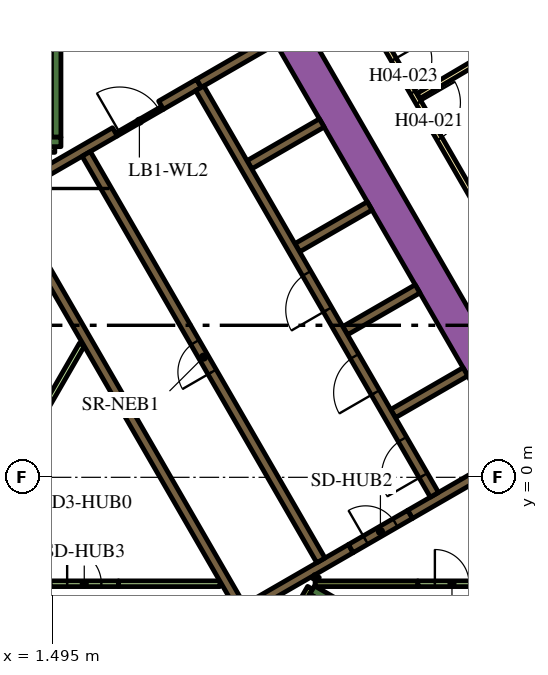
"""IFC4 building model, lengths in metres.
Left out: names, types, materials, properties, quantities, classifications, styles, units other than length and angle.
Written with IfcOpenShell. Run it as: python <this file> out.ifc"""

import sys

from ifc_helpers import new_model, si_unit, direction, frame, frame_2d, origin, place, context, subcontext, project, spatial, polyline, rectangle, outline, extrude, element, fill, save


model = new_model("IFC4")
c1 = context("Model", 3, precision=1e-05, world=origin(), true_north=direction((0.0, 1.0)))
c2 = subcontext(c1, "Body", "Model", "MODEL_VIEW")
j1 = project(units=[si_unit("LENGTHUNIT", "METRE"), si_unit("PLANEANGLEUNIT", "RADIAN")], contexts=[c1])
p1 = place(None, origin())
s1 = spatial("IfcSite", under=j1, at=p1, CompositionType="ELEMENT")
p2 = place(p1, origin())
s2 = spatial("IfcBuilding", under=s1, at=p2, CompositionType="ELEMENT")
p3 = place(p2, frame((0.0, 0.0, 62.7)))
s3 = spatial("IfcBuildingStorey", under=s2, at=p3, CompositionType="ELEMENT", Elevation=62.7)
p4 = place(p3, frame((6.776, 13.364, 0.0), z_axis=(0.0, 0.0, 1.0), x_axis=(0.500004177138, -0.8660229921, 0.0)))
e1 = element("IfcWall", 1, at=p4, inside=s3, PredefinedType="SOLIDWALL", context=c2, shape_type="SweptSolid", body=[
    extrude(rectangle(XDim=20.204, YDim=0.9, at=frame_2d((10.102, 0.0))), origin(), (0.0, 0.0, 1.0), 3.9),
])
p5 = place(p3, frame((8.334, -2.964, 0.0), z_axis=(0.0, 0.0, 1.0), x_axis=(0.866016039709, -0.500016218704, 0.0)))
e2 = element("IfcWall", 2, at=p5, inside=s3, PredefinedType="SOLIDWALL", context=c2, shape_type="SweptSolid", body=[
    extrude(rectangle(XDim=7.05, YDim=0.25, at=frame_2d((3.525, 0.0))), origin(), (0.0, 0.0, 1.0), 3.9),
])
p6 = place(p3, frame((8.163, -3.511, 0.0), z_axis=(0.0, 0.0, 1.0), x_axis=(0.500127794843, 0.865951608824, 0.0)))
e3 = element("IfcWall", 3, at=p6, inside=s3, PredefinedType="SOLIDWALL", context=c2, shape_type="SweptSolid", body=[
    extrude(rectangle(XDim=0.435, YDim=0.25, at=frame_2d((0.217, 0.0))), origin(), (0.0, 0.0, 1.0), 3.9),
])
p7 = place(p3, frame((1.6, 8.95, 0.0), z_axis=(0.0, 0.0, 1.0), x_axis=(0.0, 1.0, 0.0)))
e4 = element("IfcWall", 4, at=p7, inside=s3, PredefinedType="SOLIDWALL", context=c2, shape_type="SweptSolid", body=[
    extrude(rectangle(XDim=6.8, YDim=0.25, at=frame_2d((3.4, 0.0))), origin(), (0.0, 0.0, 1.0), 3.9),
])
p8 = place(p3, frame((1.05, 8.825, 0.0), z_axis=(0.0, 0.0, 1.0), x_axis=(1.0, 0.0, 0.0)))
e5 = element("IfcWall", 5, at=p8, inside=s3, PredefinedType="SOLIDWALL", context=c2, shape_type="SweptSolid", body=[
    extrude(rectangle(XDim=0.675, YDim=0.25, at=frame_2d((0.337, 0.0))), origin(), (0.0, 0.0, 1.0), 3.9),
])
p9 = place(p3, frame((10.464, 1.677, 0.0), z_axis=(0.0, 0.0, 1.0), x_axis=(0.86605622881, 0.499946605688, 0.0)))
e6 = element("IfcWall", 6, at=p9, inside=s3, PredefinedType="SOLIDWALL", context=c2, shape_type="SweptSolid", body=[
    extrude(rectangle(XDim=2.2, YDim=0.25, at=frame_2d((1.1, 0.0))), origin(), (0.0, 0.0, 1.0), 3.9),
])
p10 = place(p3, origin())
e7 = element("IfcWall", 7, at=p10, inside=s3, PredefinedType="SOLIDWALL", context=c2, shape_type="SweptSolid", body=[
    extrude(outline(polyline([(0.335, 6.925), (0.335, 6.925), (0.335, 7.075), (0.335, 7.075), (0.335, 7.075), (0.245, 7.075), (0.079, 7.363), (0.035, 7.439), (0.252, 7.564), (0.377, 7.348), (6.552, -3.348), (6.677, -3.564), (6.46, -3.689), (4.897, -0.981), (0.332, 6.925), (0.335, 6.925), (0.335, 6.925)])), origin(), (0.0, 0.0, 1.0), 3.9),
])
p11 = place(p3, frame((4.358, 9.791, 0.0), z_axis=(0.0, 0.0, 1.0), x_axis=(0.866079547155, 0.499906209203, 0.0)))
e8 = element("IfcWall", 8, at=p11, inside=s3, PredefinedType="SOLIDWALL", context=c2, shape_type="SweptSolid", body=[
    extrude(rectangle(XDim=1.15, YDim=0.25, at=frame_2d((0.575, 0.0))), origin(), (0.0, 0.0, 1.0), 3.9),
])
p12 = place(p3, frame((5.356, 10.367, 0.0), z_axis=(0.0, 0.0, 1.0), x_axis=(0.865978535641, 0.50008116922, 0.0)))
e9 = element("IfcWall", 9, at=p12, inside=s3, PredefinedType="SOLIDWALL", context=c2, shape_type="SweptSolid", body=[
    extrude(rectangle(XDim=2.278, YDim=0.25, at=frame_2d((1.139, 0.0))), origin(), (0.0, 0.0, 1.0), 3.9),
])
p13 = place(p3, frame((0.314, 7.456, 0.0), z_axis=(0.0, 0.0, 1.0), x_axis=(0.866013897511, 0.50001992892, 0.0)))
e10 = element("IfcWall", 10, at=p13, inside=s3, PredefinedType="SOLIDWALL", context=c2, shape_type="SweptSolid", body=[
    extrude(rectangle(XDim=3.268, YDim=0.25, at=frame_2d((1.634, 0.0))), origin(), (0.0, 0.0, 1.0), 3.9),
])
p14 = place(p3, frame((9.352, -1.875, 0.0), z_axis=(0.0, 0.0, 1.0), x_axis=(-0.866024844342, -0.500000968981, 0.0)))
e11 = element("IfcWall", 11, at=p14, inside=s3, PredefinedType="SOLIDWALL", context=c2, shape_type="SweptSolid", body=[
    extrude(rectangle(XDim=3.162, YDim=0.25, at=frame_2d((1.581, 0.0))), origin(), (0.0, 0.0, 1.0), 3.9),
])
for number, where, z_axis, x_axis in (
    (12, (6.684, 8.224, 0.0), (0.0, 0.0, 1.0), (0.866, 0.5, 0.0)),
    (13, (7.944, 6.041, 0.0), (0.0, 0.0, 1.0), (0.866, 0.5, 0.0)),
    (14, (9.204, 3.859, 0.0), (0.0, 0.0, 1.0), (0.866, 0.5, 0.0)),
):
    element("IfcWall", number, at=place(p3, frame(where, z_axis=z_axis, x_axis=x_axis)), inside=s3, PredefinedType="SOLIDWALL", context=c2, shape_type="SweptSolid", body=[
        extrude(rectangle(XDim=2.2, YDim=0.25, at=frame_2d((1.1, 0.0))), origin(), (0.0, 0.0, 1.0), 3.9),
    ])
p15 = place(p3, frame((10.911, -0.975, 0.0), z_axis=(0.0, 0.0, 1.0), x_axis=(0.866046979468, 0.499962627957, 0.0)))
e15 = element("IfcWall", 15, at=p15, inside=s3, PredefinedType="SOLIDWALL", context=c2, shape_type="SweptSolid", body=[
    extrude(rectangle(XDim=3.138, YDim=0.25, at=frame_2d((1.569, 0.0))), origin(), (0.0, 0.0, 1.0), 3.9),
])
p16 = place(p3, frame((8.412, -2.8, 0.0), z_axis=(0.0, 0.0, 1.0), x_axis=(1.0, 0.0, 0.0)))
e16 = element("IfcWall", 16, at=p16, inside=s3, PredefinedType="PARTITIONING", context=c2, shape_type="SweptSolid", body=[
    extrude(rectangle(XDim=2.702, YDim=0.15, at=frame_2d((1.351, 0.0))), origin(), (0.0, 0.0, 1.0), 3.9),
])
p17 = place(p3, frame((8.459, -2.599, 0.0), z_axis=(0.0, 0.0, 1.0), x_axis=(-0.501919277433, -0.864914469148, 0.0)))
e17 = element("IfcWall", 17, at=p17, inside=s3, PredefinedType="PARTITIONING", context=c2, shape_type="SweptSolid", body=[
    extrude(rectangle(XDim=0.109, YDim=0.15, at=frame_2d((0.054, 0.0))), origin(), (0.0, 0.0, 1.0), 3.9),
])
p18 = place(p3, frame((8.281, -2.907, 0.0), z_axis=(0.0, 0.0, 1.0), x_axis=(-0.500193841991, -0.86591346013, 0.0)))
e18 = element("IfcWall", 18, at=p18, inside=s3, PredefinedType="PARTITIONING", context=c2, shape_type="SweptSolid", body=[
    extrude(rectangle(XDim=0.583, YDim=0.15, at=frame_2d((0.292, 0.0))), origin(), (0.0, 0.0, 1.0), 3.9),
])
p19 = place(p3, frame((3.238, -2.8, 0.0), z_axis=(0.0, 0.0, 1.0), x_axis=(1.0, 0.0, 0.0)))
e19 = element("IfcWall", 19, at=p19, inside=s3, PredefinedType="PARTITIONING", context=c2, shape_type="SweptSolid", body=[
    extrude(rectangle(XDim=2.672, YDim=0.15, at=frame_2d((1.336, 0.0))), origin(), (0.0, 0.0, 1.0), 2.75),
])
p20 = place(p3, frame((1.016, 1.309, 0.0), z_axis=(0.0, 0.0, 1.0), x_axis=(0.49998231768, 0.866035612436, 0.0)))
e20 = element("IfcWall", 20, at=p20, inside=s3, PredefinedType="PARTITIONING", context=c2, shape_type="SweptSolid", body=[
    extrude(rectangle(XDim=2.521, YDim=0.15, at=frame_2d((1.26, 0.0))), origin(), (0.0, 0.0, 1.0), 2.75),
])
p21 = place(p3, frame((1.05, 8.625, 0.0), z_axis=(0.0, 0.0, 1.0), x_axis=(1.0, 0.0, 0.0)))
e21 = element("IfcWall", 21, at=p21, inside=s3, PredefinedType="PARTITIONING", context=c2, shape_type="SweptSolid", body=[
    extrude(rectangle(XDim=0.514, YDim=0.15, at=frame_2d((0.257, 0.0))), origin(), (0.0, 0.0, 1.0), 2.75),
])
p22 = place(p3, frame((11.553, -0.46, 0.0), z_axis=(0.0, 0.0, 1.0), x_axis=(-0.500006514828, 0.866021642414, 0.0)))
e22 = element("IfcWall", 22, at=p22, inside=s3, PredefinedType="SOLIDWALL", context=c2, shape_type="SweptSolid", body=[
    extrude(rectangle(XDim=12.35, YDim=0.25, at=frame_2d((6.175, 0.0))), origin(), (0.0, 0.0, 1.0), 3.9),
])
p23 = place(p22, frame((0.585, 0.0, 0.0)))
e23 = element("IfcOpeningElement", 23, at=p23, cuts=e22, PredefinedType="OPENING", context=c2, shape_type="SweptSolid", body=[
    extrude(rectangle(XDim=1.1, YDim=2.1, at=frame_2d((0.55, 1.05))), frame((0.0, 0.135, 0.0), z_axis=(0.0, -1.0, 0.0), x_axis=(1.0, 0.0, 0.0)), (0.0, 0.0, 1.0), 0.27),
])
p24 = place(p22, frame((3.105, 0.0, 0.0)))
e24 = element("IfcOpeningElement", 24, at=p24, cuts=e22, PredefinedType="OPENING", context=c2, shape_type="SweptSolid", body=[
    extrude(rectangle(XDim=1.1, YDim=2.1, at=frame_2d((0.55, 1.05))), frame((0.0, 0.135, 0.0), z_axis=(0.0, -1.0, 0.0), x_axis=(1.0, 0.0, 0.0)), (0.0, 0.0, 1.0), 0.27),
])
p25 = place(p22, frame((5.625, 0.0, 0.0)))
e25 = element("IfcOpeningElement", 25, at=p25, cuts=e22, PredefinedType="OPENING", context=c2, shape_type="SweptSolid", body=[
    extrude(rectangle(XDim=1.1, YDim=2.1, at=frame_2d((0.55, 1.05))), frame((0.0, 0.135, 0.0), z_axis=(0.0, -1.0, 0.0), x_axis=(1.0, 0.0, 0.0)), (0.0, 0.0, 1.0), 0.27),
])
p26 = place(p3, frame((8.565, -2.185, 0.0), z_axis=(0.0, 0.0, 1.0), x_axis=(-0.499997954832, 0.866026584559, 0.0)))
e26 = element("IfcWall", 26, at=p26, inside=s3, PredefinedType="SOLIDWALL", context=c2, shape_type="SweptSolid", body=[
    extrude(rectangle(XDim=12.35, YDim=0.25, at=frame_2d((6.175, 0.0))), origin(), (0.0, 0.0, 1.0), 3.9),
])
p27 = place(p26, frame((5.725, 0.0, 0.0)))
e27 = element("IfcOpeningElement", 27, at=p27, cuts=e26, PredefinedType="OPENING", context=c2, shape_type="SweptSolid", body=[
    extrude(rectangle(XDim=0.9, YDim=2.1, at=frame_2d((0.45, 1.05))), frame((0.0, 0.135, 0.0), z_axis=(0.0, -1.0, 0.0), x_axis=(1.0, 0.0, 0.0)), (0.0, 0.0, 1.0), 0.27),
])
p28 = place(p3, frame((3.183, 9.02, 0.0), z_axis=(0.0, 0.0, 1.0), x_axis=(0.866034573852, 0.49998411664, 0.0)))
e28 = element("IfcWall", 28, at=p28, inside=s3, PredefinedType="PARTITIONING", context=c2, shape_type="SweptSolid", body=[
    extrude(rectangle(XDim=1.4, YDim=0.09, at=frame_2d((0.7, 0.0))), origin(), (0.0, 0.0, 1.0), 2.75),
])
p29 = place(p28, frame((0.1, 0.0, 0.0)))
e29 = element("IfcOpeningElement", 29, at=p29, cuts=e28, PredefinedType="OPENING", context=c2, shape_type="SweptSolid", body=[
    extrude(rectangle(XDim=1.2, YDim=2.1, at=frame_2d((0.6, 1.05))), frame((0.0, 0.055, 0.0), z_axis=(0.0, -1.0, 0.0), x_axis=(1.0, 0.0, 0.0)), (0.0, 0.0, 1.0), 0.11),
])
p30 = place(p3, frame((9.352, -1.875, 0.0), z_axis=(0.0, 0.0, 1.0), x_axis=(0.865989075817, 0.500062916607, 0.0)))
e30 = element("IfcWall", 30, at=p30, inside=s3, PredefinedType="SOLIDWALL", context=c2, shape_type="SweptSolid", body=[
    extrude(rectangle(XDim=1.8, YDim=0.25, at=frame_2d((0.9, 0.0))), origin(), (0.0, 0.0, 1.0), 3.9),
])
p31 = place(p30, frame((0.45, 0.0, 0.0)))
e31 = element("IfcOpeningElement", 31, at=p31, cuts=e30, PredefinedType="OPENING", context=c2, shape_type="SweptSolid", body=[
    extrude(rectangle(XDim=0.9, YDim=2.1, at=frame_2d((0.45, 1.05))), frame((0.0, 0.135, 0.0), z_axis=(0.0, -1.0, 0.0), x_axis=(1.0, 0.0, 0.0)), (0.0, 0.0, 1.0), 0.27),
])
p32 = place(p3, frame((1.438, -2.8, 0.0), z_axis=(0.0, 0.0, 1.0), x_axis=(1.0, 0.0, 0.0)))
e32 = element("IfcWall", 32, at=p32, inside=s3, PredefinedType="PARTITIONING", context=c2, shape_type="SweptSolid", body=[
    extrude(rectangle(XDim=1.8, YDim=0.15, at=frame_2d((0.9, 0.0))), origin(), (0.0, 0.0, 1.0), 2.75),
])
p33 = place(p32, frame((0.45, 0.0, 0.0)))
e33 = element("IfcOpeningElement", 33, at=p33, cuts=e32, PredefinedType="OPENING", context=c2, shape_type="SweptSolid", body=[
    extrude(rectangle(XDim=0.9, YDim=2.1, at=frame_2d((0.45, 1.05))), frame((0.0, 0.085, 0.0), z_axis=(0.0, -1.0, 0.0), x_axis=(1.0, 0.0, 0.0)), (0.0, 0.0, 1.0), 0.17),
])
p34 = place(p3, frame((11.115, -2.8, 0.0), z_axis=(0.0, 0.0, 1.0), x_axis=(1.0, 0.0, 0.0)))
e34 = element("IfcWall", 34, at=p34, inside=s3, PredefinedType="PARTITIONING", context=c2, shape_type="SweptSolid", body=[
    extrude(rectangle(XDim=1.8, YDim=0.15, at=frame_2d((0.9, 0.0))), origin(), (0.0, 0.0, 1.0), 2.75),
])
p35 = place(p34, frame((0.45, 0.0, 0.0)))
e35 = element("IfcOpeningElement", 35, at=p35, cuts=e34, PredefinedType="OPENING", context=c2, shape_type="SweptSolid", body=[
    extrude(rectangle(XDim=0.9, YDim=2.1, at=frame_2d((0.45, 1.05))), frame((0.0, 0.085, 0.0), z_axis=(0.0, -1.0, 0.0), x_axis=(1.0, 0.0, 0.0)), (0.0, 0.0, 1.0), 0.17),
])
p36 = place(p3, frame((6.163, 18.475, 0.0), z_axis=(0.0, 0.0, 1.0), x_axis=(0.500001317485, -0.866024643133, 0.0)))
e36 = element("IfcWall", 36, at=p36, inside=s3, PredefinedType="PARTITIONING", context=c2, shape_type="SweptSolid", body=[
    extrude(rectangle(XDim=25.767, YDim=0.15, at=frame_2d((12.883, 0.0))), origin(), (0.0, 0.0, 1.0), 2.75),
])
p37 = place(p36, frame((21.138, 0.0, 0.0)))
e37 = element("IfcOpeningElement", 37, at=p37, cuts=e36, PredefinedType="OPENING", context=c2, shape_type="SweptSolid", body=[
    extrude(rectangle(XDim=1.0, YDim=2.1, at=frame_2d((0.5, 1.05))), frame((0.0, 0.085, 0.0), z_axis=(0.0, -1.0, 0.0), x_axis=(1.0, 0.0, 0.0)), (0.0, 0.0, 1.0), 0.17),
])
p38 = place(p36, frame((9.948, 0.0, 0.0)))
e38 = element("IfcOpeningElement", 38, at=p38, cuts=e36, PredefinedType="OPENING", context=c2, shape_type="SweptSolid", body=[
    extrude(rectangle(XDim=1.1, YDim=2.1, at=frame_2d((0.55, 1.05))), frame((0.0, 0.085, 0.0), z_axis=(0.0, -1.0, 0.0), x_axis=(1.0, 0.0, 0.0)), (0.0, 0.0, 1.0), 0.17),
])
p39 = place(p36, frame((8.641, 0.0, 0.0)))
e39 = element("IfcOpeningElement", 39, at=p39, cuts=e36, PredefinedType="OPENING", context=c2, shape_type="SweptSolid", body=[
    extrude(rectangle(XDim=1.0, YDim=2.1, at=frame_2d((0.5, 1.05))), frame((0.0, 0.085, 0.0), z_axis=(0.0, -1.0, 0.0), x_axis=(1.0, 0.0, 0.0)), (0.0, 0.0, 1.0), 0.17),
])
p40 = place(p36, frame((0.18, 0.0, 0.0)))
e40 = element("IfcOpeningElement", 40, at=p40, cuts=e36, PredefinedType="OPENING", context=c2, shape_type="SweptSolid", body=[
    extrude(rectangle(XDim=1.0, YDim=2.1, at=frame_2d((0.5, 1.05))), frame((0.0, 0.085, 0.0), z_axis=(0.0, -1.0, 0.0), x_axis=(1.0, 0.0, 0.0)), (0.0, 0.0, 1.0), 0.17),
])
p41 = place(p3, frame((17.856, 13.999, 0.0), z_axis=(0.0, 0.0, 1.0), x_axis=(-0.861371519381, -0.507975497047, 0.0)))
e41 = element("IfcWall", 41, at=p41, inside=s3, PredefinedType="PARTITIONING", context=c2, shape_type="SweptSolid", body=[
    extrude(rectangle(XDim=7.804, YDim=0.15, at=frame_2d((3.902, 0.0))), origin(), (0.0, 0.0, 1.0), 2.75),
])
p42 = place(p23, origin())
e42 = element("IfcDoor", 42, at=p42, inside=s3, OperationType="DOUBLE_DOOR_SLIDING", PredefinedType="DOOR", context=c2, shape_type="SweptSolid", body=[
    extrude(rectangle(XDim=1.1, YDim=2.1, at=frame_2d((0.55, 1.05))), frame((0.0, 0.025, 0.0), z_axis=(0.0, -1.0, 0.0), x_axis=(1.0, 0.0, 0.0)), (0.0, 0.0, 1.0), 0.05),
])
fill(e23, e42)
p43 = place(p24, origin())
e43 = element("IfcDoor", 43, at=p43, inside=s3, OperationType="DOUBLE_DOOR_SLIDING", PredefinedType="DOOR", context=c2, shape_type="SweptSolid", body=[
    extrude(rectangle(XDim=1.1, YDim=2.1, at=frame_2d((0.55, 1.05))), frame((0.0, 0.025, 0.0), z_axis=(0.0, -1.0, 0.0), x_axis=(1.0, 0.0, 0.0)), (0.0, 0.0, 1.0), 0.05),
])
fill(e24, e43)
p44 = place(p25, origin())
e44 = element("IfcDoor", 44, at=p44, inside=s3, OperationType="DOUBLE_DOOR_SLIDING", PredefinedType="DOOR", context=c2, shape_type="SweptSolid", body=[
    extrude(rectangle(XDim=1.1, YDim=2.1, at=frame_2d((0.55, 1.05))), frame((0.0, 0.025, 0.0), z_axis=(0.0, -1.0, 0.0), x_axis=(1.0, 0.0, 0.0)), (0.0, 0.0, 1.0), 0.05),
])
fill(e25, e44)
p45 = place(p27, origin())
e45 = element("IfcDoor", 45, at=p45, inside=s3, OperationType="SINGLE_SWING_LEFT", PredefinedType="DOOR", context=c2, shape_type="SweptSolid", body=[
    extrude(rectangle(XDim=0.9, YDim=2.1, at=frame_2d((0.45, 1.05))), frame((0.0, 0.025, 0.0), z_axis=(0.0, -1.0, 0.0), x_axis=(1.0, 0.0, 0.0)), (0.0, 0.0, 1.0), 0.05),
])
fill(e27, e45)
p46 = place(p29, origin())
e46 = element("IfcDoor", 46, at=p46, inside=s3, OperationType="SINGLE_SWING_LEFT", PredefinedType="DOOR", context=c2, shape_type="SweptSolid", body=[
    extrude(rectangle(XDim=1.2, YDim=2.1, at=frame_2d((0.6, 1.05))), frame((0.0, 0.025, 0.0), z_axis=(0.0, -1.0, 0.0), x_axis=(1.0, 0.0, 0.0)), (0.0, 0.0, 1.0), 0.05),
])
fill(e29, e46)
p47 = place(p31, origin())
e47 = element("IfcDoor", 47, at=p47, inside=s3, OperationType="SINGLE_SWING_LEFT", PredefinedType="DOOR", context=c2, shape_type="SweptSolid", body=[
    extrude(rectangle(XDim=0.9, YDim=2.1, at=frame_2d((0.45, 1.05))), frame((0.0, 0.025, 0.0), z_axis=(0.0, -1.0, 0.0), x_axis=(1.0, 0.0, 0.0)), (0.0, 0.0, 1.0), 0.05),
])
fill(e31, e47)
p48 = place(p33, origin())
e48 = element("IfcDoor", 48, at=p48, inside=s3, OperationType="SINGLE_SWING_LEFT", PredefinedType="DOOR", context=c2, shape_type="SweptSolid", body=[
    extrude(rectangle(XDim=0.9, YDim=2.1, at=frame_2d((0.45, 1.05))), frame((0.0, 0.025, 0.0), z_axis=(0.0, -1.0, 0.0), x_axis=(1.0, 0.0, 0.0)), (0.0, 0.0, 1.0), 0.05),
])
fill(e33, e48)
p49 = place(p35, origin())
e49 = element("IfcDoor", 49, at=p49, inside=s3, OperationType="SINGLE_SWING_LEFT", PredefinedType="DOOR", context=c2, shape_type="SweptSolid", body=[
    extrude(rectangle(XDim=0.9, YDim=2.1, at=frame_2d((0.45, 1.05))), frame((0.0, 0.025, 0.0), z_axis=(0.0, -1.0, 0.0), x_axis=(1.0, 0.0, 0.0)), (0.0, 0.0, 1.0), 0.05),
])
fill(e35, e49)
p50 = place(p38, origin())
e50 = element("IfcDoor", 50, at=p50, inside=s3, OperationType="SINGLE_SWING_LEFT", PredefinedType="DOOR", context=c2, shape_type="SweptSolid", body=[
    extrude(rectangle(XDim=1.1, YDim=2.1, at=frame_2d((0.55, 1.05))), frame((0.0, 0.025, 0.0), z_axis=(0.0, -1.0, 0.0), x_axis=(1.0, 0.0, 0.0)), (0.0, 0.0, 1.0), 0.05),
])
fill(e38, e50)
p51 = place(p39, origin())
e51 = element("IfcDoor", 51, at=p51, inside=s3, OperationType="SINGLE_SWING_RIGHT", PredefinedType="DOOR", context=c2, shape_type="SweptSolid", body=[
    extrude(rectangle(XDim=1.0, YDim=2.1, at=frame_2d((0.5, 1.05))), frame((0.0, 0.025, 0.0), z_axis=(0.0, -1.0, 0.0), x_axis=(1.0, 0.0, 0.0)), (0.0, 0.0, 1.0), 0.05),
])
fill(e39, e51)
save(model, sys.argv[1])
